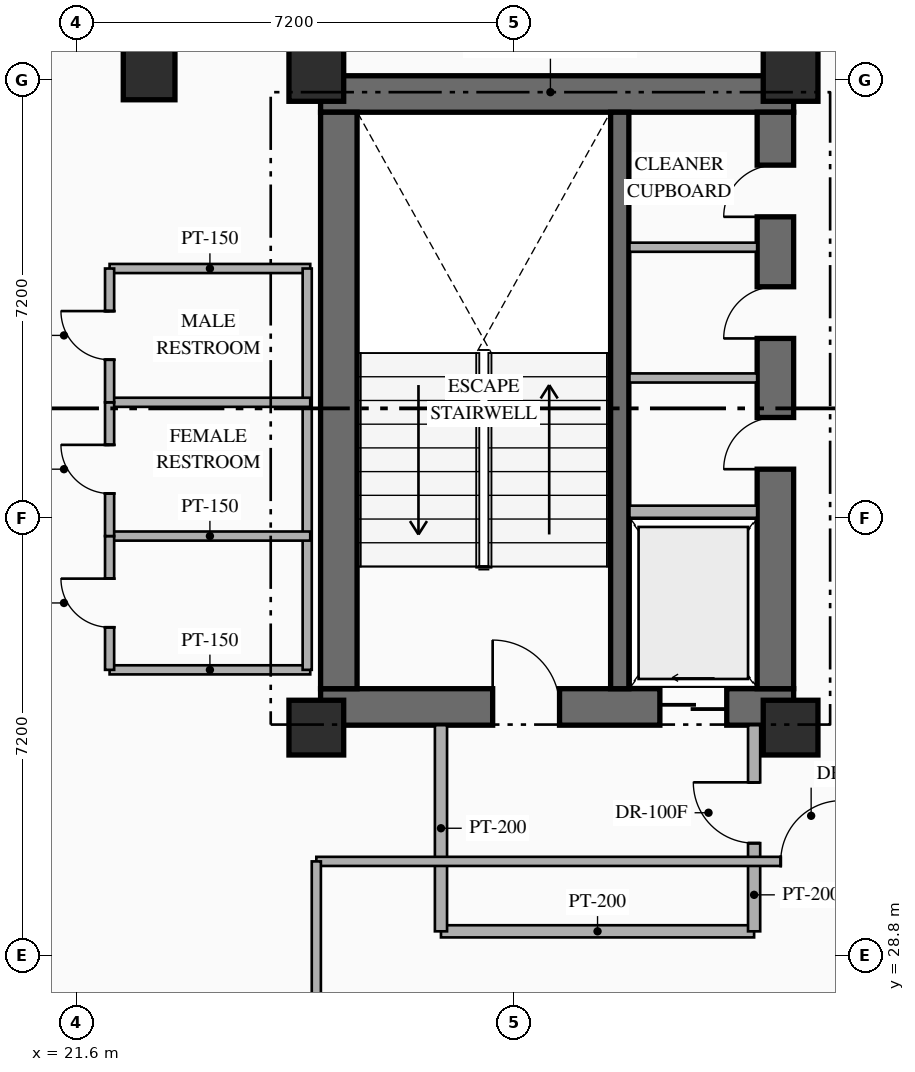
"""IFC4 building model, lengths in metres.
Left out: names, types, materials, properties, quantities, classifications, styles, units other than length and angle.
Written with IfcOpenShell. Run it as: python <this file> out.ifc"""

import sys

from ifc_helpers import new_model, si_unit, direction, frame, frame_2d, origin, origin_2d, place, context, subcontext, project, spatial, rectangle, hollow_rectangle, extrude, element, fill, save


model = new_model("IFC4")
c1 = context("Model", 3, precision=1e-05, world=origin(), true_north=direction((0.0, 1.0)))
c2 = subcontext(c1, "Body", "Model", "MODEL_VIEW")
j1 = project(units=[si_unit("LENGTHUNIT", "METRE"), si_unit("PLANEANGLEUNIT", "RADIAN")], contexts=[c1])
p1 = place(None, origin())
s1 = spatial("IfcSite", under=j1, at=p1, CompositionType="ELEMENT")
p2 = place(p1, origin())
s2 = spatial("IfcBuilding", under=s1, at=p2, CompositionType="ELEMENT")
p3 = place(p2, frame((0.0, 0.0, 115.65)))
s3 = spatial("IfcBuildingStorey", under=s2, at=p3, CompositionType="ELEMENT", Elevation=115.65)
p4 = place(p3, frame((25.62, 32.89, 0.0), z_axis=(0.0, 0.0, 1.0), x_axis=(1.0, 0.0, 0.0)))
e1 = element("IfcWall", 1, at=p4, inside=s3, PredefinedType="SHEAR", context=c2, shape_type="SweptSolid", body=[
    extrude(rectangle(XDim=7.78, YDim=0.6, at=frame_2d((3.89, 0.0))), origin(), (0.0, 0.0, 1.0), 3.6),
])
p5 = place(p4, frame((2.83, 0.0, 0.0)))
e2 = element("IfcOpeningElement", 2, at=p5, cuts=e1, PredefinedType="OPENING", context=c2, shape_type="SweptSolid", body=[
    extrude(rectangle(XDim=1.1, YDim=2.2, at=frame_2d((0.55, 1.1))), frame((0.0, 0.31, 0.0), z_axis=(0.0, -1.0, 0.0), x_axis=(1.0, 0.0, 0.0)), (0.0, 0.0, 1.0), 0.62),
])
p6 = place(p4, frame((5.58, 0.0, 0.0)))
e3 = element("IfcOpeningElement", 3, at=p6, cuts=e1, PredefinedType="OPENING", context=c2, shape_type="SweptSolid", body=[
    extrude(rectangle(XDim=1.1, YDim=2.15, at=frame_2d((0.55, 1.075))), frame((0.0, 0.31, 0.0), z_axis=(0.0, -1.0, 0.0), x_axis=(1.0, 0.0, 0.0)), (0.0, 0.0, 1.0), 0.62),
])
p7 = place(p3, frame((25.62, 42.97, 0.0), z_axis=(0.0, 0.0, 1.0), x_axis=(1.0, 0.0, 0.0)))
e4 = element("IfcWall", 4, at=p7, inside=s3, PredefinedType="SHEAR", context=c2, shape_type="SweptSolid", body=[
    extrude(rectangle(XDim=7.78, YDim=0.6, at=frame_2d((3.89, 0.0))), origin(), (0.0, 0.0, 1.0), 3.6),
])
p8 = place(p3, frame((25.92, 33.19, 0.0), z_axis=(0.0, 0.0, 1.0), x_axis=(0.0, 1.0, 0.0)))
e5 = element("IfcWall", 5, at=p8, inside=s3, PredefinedType="SHEAR", context=c2, shape_type="SweptSolid", body=[
    extrude(rectangle(XDim=9.48, YDim=0.6, at=frame_2d((4.74, 0.0))), origin(), (0.0, 0.0, 1.0), 3.6),
])
p9 = place(p3, frame((33.1, 33.19, 0.0), z_axis=(0.0, 0.0, 1.0), x_axis=(0.0, 1.0, 0.0)))
e6 = element("IfcWall", 6, at=p9, inside=s3, PredefinedType="SHEAR", context=c2, shape_type="SweptSolid", body=[
    extrude(rectangle(XDim=9.48, YDim=0.6, at=frame_2d((4.74, 0.0))), origin(), (0.0, 0.0, 1.0), 3.6),
])
p10 = place(p9, frame((3.61, 0.0, 0.0)))
e7 = element("IfcOpeningElement", 7, at=p10, cuts=e6, PredefinedType="OPENING", context=c2, shape_type="SweptSolid", body=[
    extrude(rectangle(XDim=0.85, YDim=2.08, at=frame_2d((0.425, 1.04))), frame((0.0, 0.31, 0.0), z_axis=(0.0, -1.0, 0.0), x_axis=(1.0, 0.0, 0.0)), (0.0, 0.0, 1.0), 0.62),
])
p11 = place(p9, frame((5.76, 0.0, 0.0)))
e8 = element("IfcOpeningElement", 8, at=p11, cuts=e6, PredefinedType="OPENING", context=c2, shape_type="SweptSolid", body=[
    extrude(rectangle(XDim=0.85, YDim=2.08, at=frame_2d((0.425, 1.04))), frame((0.0, 0.31, 0.0), z_axis=(0.0, -1.0, 0.0), x_axis=(1.0, 0.0, 0.0)), (0.0, 0.0, 1.0), 0.62),
])
p12 = place(p9, frame((7.76, 0.0, 0.0)))
e9 = element("IfcOpeningElement", 9, at=p12, cuts=e6, PredefinedType="OPENING", context=c2, shape_type="SweptSolid", body=[
    extrude(rectangle(XDim=0.85, YDim=2.08, at=frame_2d((0.425, 1.04))), frame((0.0, 0.31, 0.0), z_axis=(0.0, -1.0, 0.0), x_axis=(1.0, 0.0, 0.0)), (0.0, 0.0, 1.0), 0.62),
])
p13 = place(p3, frame((30.54, 33.19, 0.0), z_axis=(0.0, 0.0, 1.0), x_axis=(0.0, 1.0, 0.0)))
e10 = element("IfcWall", 10, at=p13, inside=s3, PredefinedType="SHEAR", context=c2, shape_type="SweptSolid", body=[
    extrude(rectangle(XDim=9.48, YDim=0.3, at=frame_2d((4.74, 0.0))), origin(), (0.0, 0.0, 1.0), 3.6),
])
for number, where, z_axis, x_axis in (
    (11, (25.55, 32.55, 0.0), (0.0, 0.0, 1.0), (1.0, 0.0, 0.0)),
    (12, (33.35, 32.55, 0.0), (0.0, 0.0, 1.0), (1.0, 0.0, 0.0)),
    (13, (25.55, 43.3, 0.0), (0.0, 0.0, 1.0), (1.0, 0.0, 0.0)),
    (14, (33.35, 43.3, 0.0), (0.0, 0.0, 1.0), (1.0, 0.0, 0.0)),
):
    element("IfcColumn", number, at=place(p3, frame(where, z_axis=z_axis, x_axis=x_axis)), inside=s3, PredefinedType="COLUMN", context=c2, shape_type="SweptSolid", body=[
        extrude(rectangle(XDim=0.9, YDim=0.9, at=origin_2d()), origin(), (0.0, 0.0, 1.0), 3.6),
    ])
p14 = place(p3, frame((22.8, 43.3, 0.0), z_axis=(0.0, 0.0, 1.0), x_axis=(1.0, 0.0, 0.0)))
e15 = element("IfcColumn", 15, at=p14, inside=s3, PredefinedType="COLUMN", context=c2, shape_type="SweptSolid", body=[
    extrude(hollow_rectangle(XDim=0.85, YDim=0.85, WallThickness=0.032, at=origin_2d()), origin(), (0.0, 0.0, 1.0), 3.6),
])
p15 = place(p3, frame((30.7, 36.1, 0.0), z_axis=(0.0, 0.0, 1.0), x_axis=(1.0, 0.0, 0.0)))
e16 = element("IfcWall", 16, at=p15, inside=s3, PredefinedType="STANDARD", context=c2, shape_type="SweptSolid", body=[
    extrude(rectangle(XDim=2.1, YDim=0.2, at=frame_2d((1.05, 0.0))), origin(), (0.0, 0.0, 1.0), 3.35),
])
for number, where, z_axis, x_axis in (
    (17, (30.7, 38.3, 0.0), (0.0, 0.0, 1.0), (1.0, 0.0, 0.0)),
    (18, (30.7, 40.45, 0.0), (0.0, 0.0, 1.0), (1.0, 0.0, 0.0)),
):
    element("IfcWall", number, at=place(p3, frame(where, z_axis=z_axis, x_axis=x_axis)), inside=s3, PredefinedType="PARTITIONING", context=c2, shape_type="SweptSolid", body=[
        extrude(rectangle(XDim=2.1, YDim=0.15, at=frame_2d((1.05, 0.0))), origin(), (0.0, 0.0, 1.0), 3.35),
    ])
p16 = place(p3, frame((27.6, 29.2, 0.0), z_axis=(0.0, 0.0, 1.0), x_axis=(1.0, 0.0, 0.0)))
e19 = element("IfcWall", 19, at=p16, inside=s3, PredefinedType="STANDARD", context=c2, shape_type="SweptSolid", body=[
    extrude(rectangle(XDim=5.15, YDim=0.2, at=frame_2d((2.575, 0.0))), origin(), (0.0, 0.0, 1.0), 3.35),
])
p17 = place(p3, frame((27.6, 29.2, 0.0), z_axis=(0.0, 0.0, 1.0), x_axis=(0.0, 1.0, 0.0)))
e20 = element("IfcWall", 20, at=p17, inside=s3, PredefinedType="STANDARD", context=c2, shape_type="SweptSolid", body=[
    extrude(rectangle(XDim=3.39, YDim=0.2, at=frame_2d((1.695, 0.0))), origin(), (0.0, 0.0, 1.0), 3.35),
])
p18 = place(p3, frame((32.75, 29.2, 0.0), z_axis=(0.0, 0.0, 1.0), x_axis=(0.0, 1.0, 0.0)))
e21 = element("IfcWall", 21, at=p18, inside=s3, PredefinedType="STANDARD", context=c2, shape_type="SweptSolid", body=[
    extrude(rectangle(XDim=3.39, YDim=0.2, at=frame_2d((1.695, 0.0))), origin(), (0.0, 0.0, 1.0), 3.35),
])
p19 = place(p18, frame((1.45, 0.0, 0.0)))
e22 = element("IfcOpeningElement", 22, at=p19, cuts=e21, PredefinedType="OPENING", context=c2, shape_type="SweptSolid", body=[
    extrude(rectangle(XDim=1.0, YDim=2.2, at=frame_2d((0.5, 1.1))), frame((0.0, 0.11, 0.0), z_axis=(0.0, -1.0, 0.0), x_axis=(1.0, 0.0, 0.0)), (0.0, 0.0, 1.0), 0.22),
])
for number, where, z_axis, x_axis in (
    (23, (22.15, 33.5, 0.0), (0.0, 0.0, 1.0), (1.0, 0.0, 0.0)),
    (24, (22.15, 40.1, 0.0), (0.0, 0.0, 1.0), (1.0, 0.0, 0.0)),
):
    element("IfcWall", number, at=place(p3, frame(where, z_axis=z_axis, x_axis=x_axis)), inside=s3, PredefinedType="PARTITIONING", context=c2, shape_type="SweptSolid", body=[
        extrude(rectangle(XDim=3.3, YDim=0.15, at=frame_2d((1.65, 0.0))), origin(), (0.0, 0.0, 1.0), 3.35),
    ])
p20 = place(p3, frame((25.4, 33.5, 0.0), z_axis=(0.0, 0.0, 1.0), x_axis=(0.0, 1.0, 0.0)))
e25 = element("IfcWall", 25, at=p20, inside=s3, PredefinedType="PARTITIONING", context=c2, shape_type="SweptSolid", body=[
    extrude(rectangle(XDim=6.6, YDim=0.15, at=frame_2d((3.3, 0.0))), origin(), (0.0, 0.0, 1.0), 3.35),
])
for number, where, z_axis, x_axis in (
    (26, (22.15, 35.7, 0.0), (0.0, 0.0, 1.0), (1.0, 0.0, 0.0)),
    (27, (22.15, 37.9, 0.0), (0.0, 0.0, 1.0), (1.0, 0.0, 0.0)),
):
    element("IfcWall", number, at=place(p3, frame(where, z_axis=z_axis, x_axis=x_axis)), inside=s3, PredefinedType="PARTITIONING", context=c2, shape_type="SweptSolid", body=[
        extrude(rectangle(XDim=3.3, YDim=0.15, at=frame_2d((1.65, 0.0))), origin(), (0.0, 0.0, 1.0), 3.35),
    ])
p21 = place(p3, frame((22.15, 33.5, 0.0), z_axis=(0.0, 0.0, 1.0), x_axis=(0.0, 1.0, 0.0)))
e28 = element("IfcWall", 28, at=p21, inside=s3, PredefinedType="PARTITIONING", context=c2, shape_type="SweptSolid", body=[
    extrude(rectangle(XDim=2.2, YDim=0.15, at=frame_2d((1.1, 0.0))), origin(), (0.0, 0.0, 1.0), 3.35),
])
p22 = place(p21, frame((0.7, 0.0, 0.0)))
e29 = element("IfcOpeningElement", 29, at=p22, cuts=e28, PredefinedType="OPENING", context=c2, shape_type="SweptSolid", body=[
    extrude(rectangle(XDim=0.8, YDim=2.06, at=frame_2d((0.4, 1.03))), frame((0.0, 0.085, 0.0), z_axis=(0.0, -1.0, 0.0), x_axis=(1.0, 0.0, 0.0)), (0.0, 0.0, 1.0), 0.17),
])
p23 = place(p3, frame((22.15, 35.7, 0.0), z_axis=(0.0, 0.0, 1.0), x_axis=(0.0, 1.0, 0.0)))
e30 = element("IfcWall", 30, at=p23, inside=s3, PredefinedType="PARTITIONING", context=c2, shape_type="SweptSolid", body=[
    extrude(rectangle(XDim=2.2, YDim=0.15, at=frame_2d((1.1, 0.0))), origin(), (0.0, 0.0, 1.0), 3.35),
])
p24 = place(p23, frame((0.7, 0.0, 0.0)))
e31 = element("IfcOpeningElement", 31, at=p24, cuts=e30, PredefinedType="OPENING", context=c2, shape_type="SweptSolid", body=[
    extrude(rectangle(XDim=0.8, YDim=2.06, at=frame_2d((0.4, 1.03))), frame((0.0, 0.085, 0.0), z_axis=(0.0, -1.0, 0.0), x_axis=(1.0, 0.0, 0.0)), (0.0, 0.0, 1.0), 0.17),
])
p25 = place(p3, frame((22.15, 37.9, 0.0), z_axis=(0.0, 0.0, 1.0), x_axis=(0.0, 1.0, 0.0)))
e32 = element("IfcWall", 32, at=p25, inside=s3, PredefinedType="PARTITIONING", context=c2, shape_type="SweptSolid", body=[
    extrude(rectangle(XDim=2.2, YDim=0.15, at=frame_2d((1.1, 0.0))), origin(), (0.0, 0.0, 1.0), 3.35),
])
p26 = place(p25, frame((0.7, 0.0, 0.0)))
e33 = element("IfcOpeningElement", 33, at=p26, cuts=e32, PredefinedType="OPENING", context=c2, shape_type="SweptSolid", body=[
    extrude(rectangle(XDim=0.8, YDim=2.06, at=frame_2d((0.4, 1.03))), frame((0.0, 0.085, 0.0), z_axis=(0.0, -1.0, 0.0), x_axis=(1.0, 0.0, 0.0)), (0.0, 0.0, 1.0), 0.17),
])
p27 = place(p3, frame((25.55, 30.35, 0.0), z_axis=(0.0, 0.0, 1.0), x_axis=(1.0, 0.0, 0.0)))
e34 = element("IfcWall", 34, at=p27, inside=s3, PredefinedType="PARTITIONING", context=c2, shape_type="SweptSolid", body=[
    extrude(rectangle(XDim=9.4, YDim=0.15, at=frame_2d((4.7, 0.0))), origin(), (0.0, 0.0, 1.0), 3.35),
])
p28 = place(p27, frame((7.638, 0.0, 0.0)))
e35 = element("IfcOpeningElement", 35, at=p28, cuts=e34, PredefinedType="OPENING", context=c2, shape_type="SweptSolid", body=[
    extrude(rectangle(XDim=1.0, YDim=2.15, at=frame_2d((0.5, 1.075))), frame((0.0, 0.085, 0.0), z_axis=(0.0, -1.0, 0.0), x_axis=(1.0, 0.0, 0.0)), (0.0, 0.0, 1.0), 0.17),
])
p29 = place(p3, frame((25.55, 23.2, 0.0), z_axis=(0.0, 0.0, 1.0), x_axis=(0.0, 1.0, 0.0)))
e36 = element("IfcWall", 36, at=p29, inside=s3, PredefinedType="PARTITIONING", context=c2, shape_type="SweptSolid", body=[
    extrude(rectangle(XDim=7.15, YDim=0.15, at=frame_2d((3.575, 0.0))), origin(), (0.0, 0.0, 1.0), 2.695),
])
p30 = place(p5, origin())
e37 = element("IfcDoor", 37, at=p30, inside=s3, OperationType="SINGLE_SWING_LEFT", PredefinedType="DOOR", context=c2, shape_type="SweptSolid", body=[
    extrude(rectangle(XDim=1.1, YDim=2.2, at=frame_2d((0.55, 1.1))), frame((0.0, 0.025, 0.0), z_axis=(0.0, -1.0, 0.0), x_axis=(1.0, 0.0, 0.0)), (0.0, 0.0, 1.0), 0.05),
])
fill(e2, e37)
p31 = place(p6, origin())
e38 = element("IfcDoor", 38, at=p31, inside=s3, OperationType="SLIDING_TO_LEFT", PredefinedType="USERDEFINED", context=c2, shape_type="SweptSolid", body=[
    extrude(rectangle(XDim=1.1, YDim=2.15, at=frame_2d((0.55, 1.075))), frame((0.0, 0.025, 0.0), z_axis=(0.0, -1.0, 0.0), x_axis=(1.0, 0.0, 0.0)), (0.0, 0.0, 1.0), 0.05),
])
fill(e3, e38)
p32 = place(p10, origin())
e39 = element("IfcDoor", 39, at=p32, inside=s3, OperationType="SINGLE_SWING_LEFT", PredefinedType="DOOR", context=c2, shape_type="SweptSolid", body=[
    extrude(rectangle(XDim=0.85, YDim=2.08, at=frame_2d((0.425, 1.04))), frame((0.0, 0.025, 0.0), z_axis=(0.0, -1.0, 0.0), x_axis=(1.0, 0.0, 0.0)), (0.0, 0.0, 1.0), 0.05),
])
fill(e7, e39)
p33 = place(p11, origin())
e40 = element("IfcDoor", 40, at=p33, inside=s3, OperationType="SINGLE_SWING_LEFT", PredefinedType="DOOR", context=c2, shape_type="SweptSolid", body=[
    extrude(rectangle(XDim=0.85, YDim=2.08, at=frame_2d((0.425, 1.04))), frame((0.0, 0.025, 0.0), z_axis=(0.0, -1.0, 0.0), x_axis=(1.0, 0.0, 0.0)), (0.0, 0.0, 1.0), 0.05),
])
fill(e8, e40)
p34 = place(p12, origin())
e41 = element("IfcDoor", 41, at=p34, inside=s3, OperationType="SINGLE_SWING_LEFT", PredefinedType="DOOR", context=c2, shape_type="SweptSolid", body=[
    extrude(rectangle(XDim=0.85, YDim=2.08, at=frame_2d((0.425, 1.04))), frame((0.0, 0.025, 0.0), z_axis=(0.0, -1.0, 0.0), x_axis=(1.0, 0.0, 0.0)), (0.0, 0.0, 1.0), 0.05),
])
fill(e9, e41)
p35 = place(p19, origin())
e42 = element("IfcDoor", 42, at=p35, inside=s3, OperationType="SINGLE_SWING_RIGHT", PredefinedType="DOOR", context=c2, shape_type="SweptSolid", body=[
    extrude(rectangle(XDim=1.0, YDim=2.2, at=frame_2d((0.5, 1.1))), frame((0.0, 0.025, 0.0), z_axis=(0.0, -1.0, 0.0), x_axis=(1.0, 0.0, 0.0)), (0.0, 0.0, 1.0), 0.05),
])
fill(e22, e42)
p36 = place(p22, origin())
e43 = element("IfcDoor", 43, at=p36, inside=s3, OperationType="SINGLE_SWING_RIGHT", PredefinedType="DOOR", context=c2, shape_type="SweptSolid", body=[
    extrude(rectangle(XDim=0.8, YDim=2.06, at=frame_2d((0.4, 1.03))), frame((0.0, 0.025, 0.0), z_axis=(0.0, -1.0, 0.0), x_axis=(1.0, 0.0, 0.0)), (0.0, 0.0, 1.0), 0.05),
])
fill(e29, e43)
p37 = place(p24, origin())
e44 = element("IfcDoor", 44, at=p37, inside=s3, OperationType="SINGLE_SWING_RIGHT", PredefinedType="DOOR", context=c2, shape_type="SweptSolid", body=[
    extrude(rectangle(XDim=0.8, YDim=2.06, at=frame_2d((0.4, 1.03))), frame((0.0, 0.025, 0.0), z_axis=(0.0, -1.0, 0.0), x_axis=(1.0, 0.0, 0.0)), (0.0, 0.0, 1.0), 0.05),
])
fill(e31, e44)
p38 = place(p26, origin())
e45 = element("IfcDoor", 45, at=p38, inside=s3, OperationType="SINGLE_SWING_RIGHT", PredefinedType="DOOR", context=c2, shape_type="SweptSolid", body=[
    extrude(rectangle(XDim=0.8, YDim=2.06, at=frame_2d((0.4, 1.03))), frame((0.0, 0.025, 0.0), z_axis=(0.0, -1.0, 0.0), x_axis=(1.0, 0.0, 0.0)), (0.0, 0.0, 1.0), 0.05),
])
fill(e33, e45)
p39 = place(p28, origin())
e46 = element("IfcDoor", 46, at=p39, inside=s3, OperationType="SINGLE_SWING_RIGHT", PredefinedType="DOOR", context=c2, shape_type="SweptSolid", body=[
    extrude(rectangle(XDim=1.0, YDim=2.15, at=frame_2d((0.5, 1.075))), frame((0.0, 0.025, 0.0), z_axis=(0.0, -1.0, 0.0), x_axis=(1.0, 0.0, 0.0)), (0.0, 0.0, 1.0), 0.05),
])
fill(e35, e46)
save(model, sys.argv[1])
